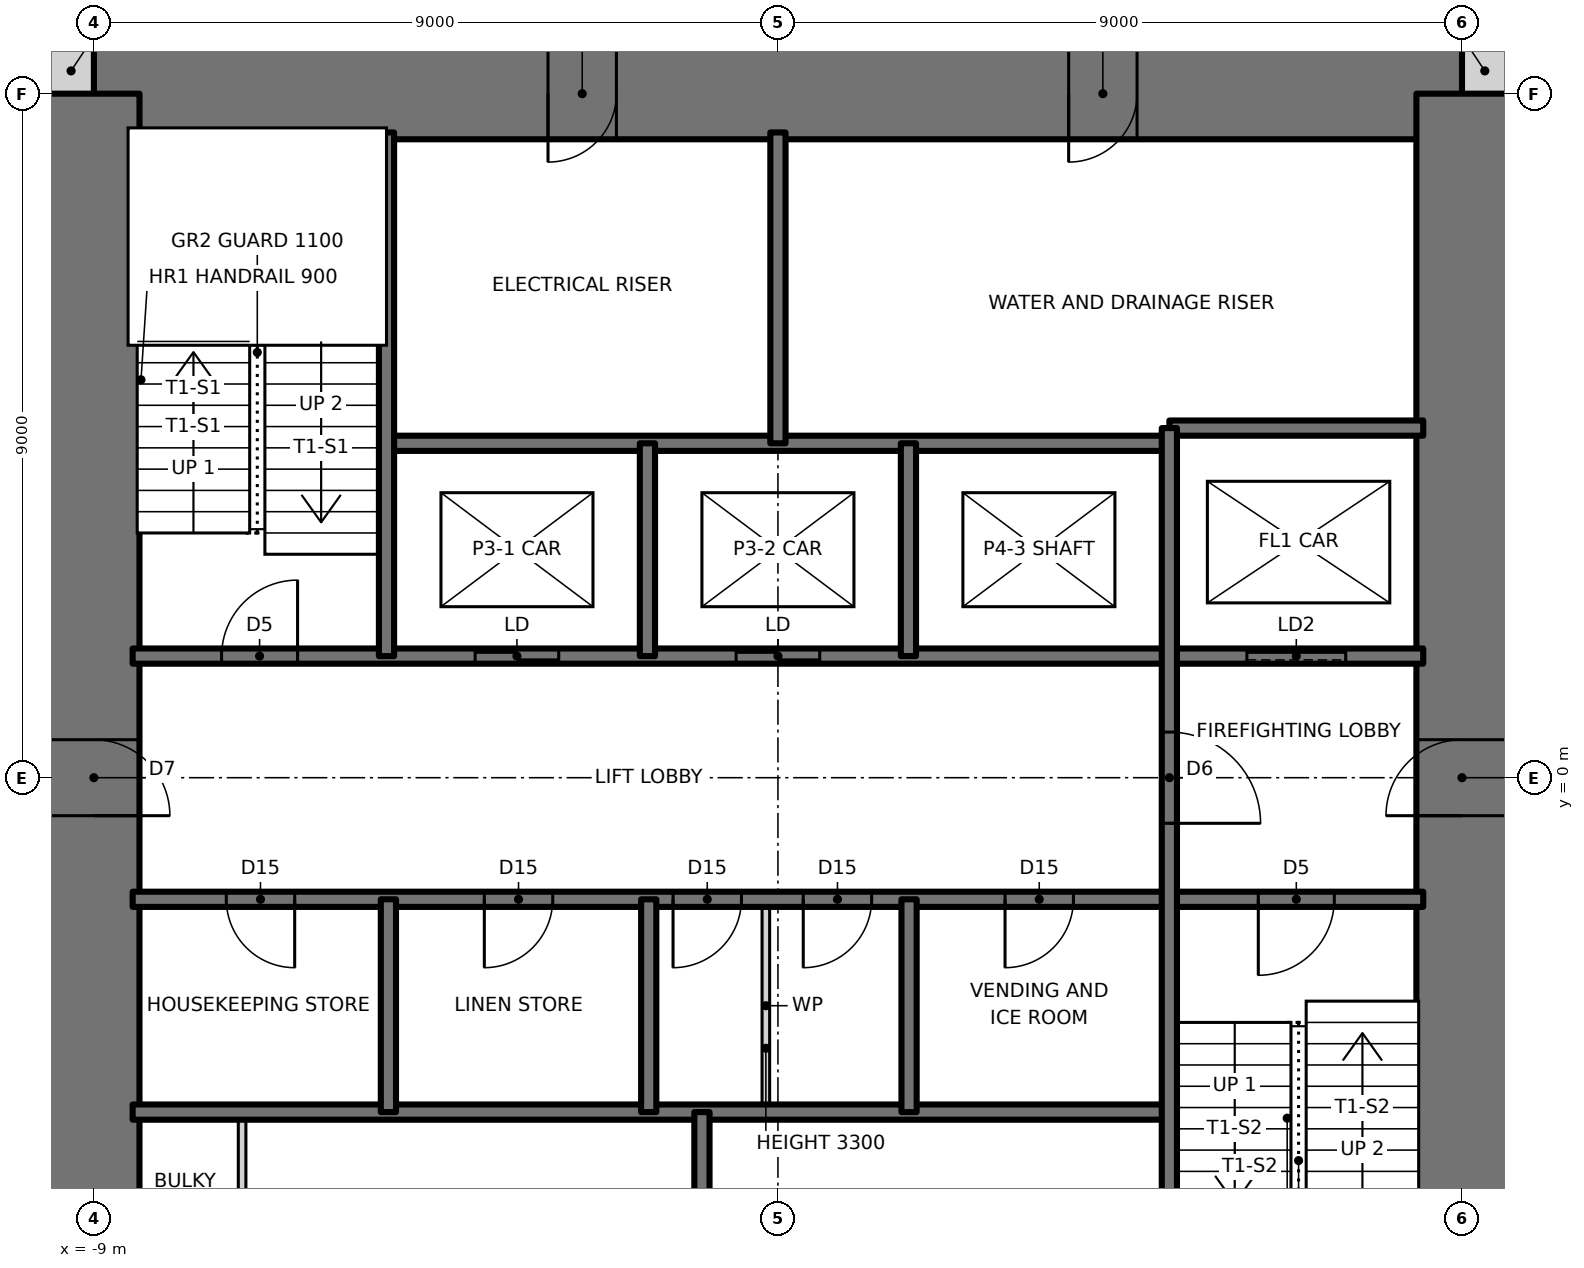
"""IFC4 building model, lengths in metres.
Left out: names, types, materials, properties, quantities, classifications, styles, units other than length and angle.
Written with IfcOpenShell. Run it as: python <this file> out.ifc"""

import sys

from ifc_helpers import new_model, si_unit, direction, frame, frame_2d, origin, place, context, subcontext, project, spatial, rectangle, extrude, element, fill, save


model = new_model("IFC4")
c1 = context("Model", 3, precision=1e-05, world=origin(), true_north=direction((0.0, 1.0)))
c2 = subcontext(c1, "Body", "Model", "MODEL_VIEW")
j1 = project(units=[si_unit("LENGTHUNIT", "METRE"), si_unit("PLANEANGLEUNIT", "RADIAN")], contexts=[c1])
p1 = place(None, origin())
s1 = spatial("IfcSite", under=j1, at=p1, CompositionType="ELEMENT")
p2 = place(p1, origin())
s2 = spatial("IfcBuilding", under=s1, at=p2, CompositionType="ELEMENT")
p3 = place(p2, frame((0.0, 0.0, 174.0)))
s3 = spatial("IfcBuildingStorey", under=s2, at=p3, CompositionType="ELEMENT", Elevation=174.0)
for number, where, z_axis, x_axis in (
    (1, (9.0, 9.3, 0.0), (0.0, 0.0, 1.0), (1.0, 0.0, 0.0)),
    (2, (-9.6, 9.3, 0.0), (0.0, 0.0, 1.0), (1.0, 0.0, 0.0)),
):
    element("IfcWall", number, at=place(p3, frame(where, z_axis=z_axis, x_axis=x_axis)), inside=s3, PredefinedType="SOLIDWALL", context=c2, shape_type="SweptSolid", body=[
        extrude(rectangle(XDim=0.6, YDim=0.6, at=frame_2d((0.3, 0.0))), origin(), (0.0, 0.0, 1.0), 3.5),
    ])
p4 = place(p3, frame((9.0, 9.0, 0.0), z_axis=(0.0, 0.0, 1.0), x_axis=(-1.0, 0.0, 0.0)))
e3 = element("IfcWall", 3, at=p4, inside=s3, PredefinedType="SHEAR", context=c2, shape_type="SweptSolid", body=[
    extrude(rectangle(XDim=18.0, YDim=1.2, at=frame_2d((9.0, 0.0))), origin(), (0.0, 0.0, 1.0), 3.5),
])
p5 = place(p4, frame((11.125, 0.0, 0.0)))
e4 = element("IfcOpeningElement", 4, at=p5, cuts=e3, PredefinedType="OPENING", context=c2, shape_type="SweptSolid", body=[
    extrude(rectangle(XDim=0.9, YDim=2.1, at=frame_2d((0.45, 1.05))), frame((0.0, 0.61, 0.0), z_axis=(0.0, -1.0, 0.0), x_axis=(1.0, 0.0, 0.0)), (0.0, 0.0, 1.0), 1.22),
])
p6 = place(p4, frame((4.275, 0.0, 0.0)))
e5 = element("IfcOpeningElement", 5, at=p6, cuts=e3, PredefinedType="OPENING", context=c2, shape_type="SweptSolid", body=[
    extrude(rectangle(XDim=0.9, YDim=2.1, at=frame_2d((0.45, 1.05))), frame((0.0, 0.61, 0.0), z_axis=(0.0, -1.0, 0.0), x_axis=(1.0, 0.0, 0.0)), (0.0, 0.0, 1.0), 1.22),
])
p7 = place(p3, frame((9.0, -9.0, 0.0), z_axis=(0.0, 0.0, 1.0), x_axis=(0.0, 1.0, 0.0)))
e6 = element("IfcWall", 6, at=p7, inside=s3, PredefinedType="SHEAR", context=c2, shape_type="SweptSolid", body=[
    extrude(rectangle(XDim=18.0, YDim=1.2, at=frame_2d((9.0, 0.0))), origin(), (0.0, 0.0, 1.0), 3.5),
])
p8 = place(p7, frame((8.5, 0.0, 0.0)))
e7 = element("IfcOpeningElement", 7, at=p8, cuts=e6, PredefinedType="OPENING", context=c2, shape_type="SweptSolid", body=[
    extrude(rectangle(XDim=1.0, YDim=2.1, at=frame_2d((0.5, 1.05))), frame((0.0, 0.61, 0.0), z_axis=(0.0, -1.0, 0.0), x_axis=(1.0, 0.0, 0.0)), (0.0, 0.0, 1.0), 1.22),
])
p9 = place(p3, frame((-9.0, 9.0, 0.0), z_axis=(0.0, 0.0, 1.0), x_axis=(0.0, -1.0, 0.0)))
e8 = element("IfcWall", 8, at=p9, inside=s3, PredefinedType="SHEAR", context=c2, shape_type="SweptSolid", body=[
    extrude(rectangle(XDim=18.0, YDim=1.2, at=frame_2d((9.0, 0.0))), origin(), (0.0, 0.0, 1.0), 3.5),
])
p10 = place(p9, frame((8.5, 0.0, 0.0)))
e9 = element("IfcOpeningElement", 9, at=p10, cuts=e8, PredefinedType="OPENING", context=c2, shape_type="SweptSolid", body=[
    extrude(rectangle(XDim=1.0, YDim=2.1, at=frame_2d((0.5, 1.05))), frame((0.0, 0.61, 0.0), z_axis=(0.0, -1.0, 0.0), x_axis=(1.0, 0.0, 0.0)), (0.0, 0.0, 1.0), 1.22),
])
p11 = place(p3, frame((-8.49, -4.4, 0.0), z_axis=(0.0, 0.0, 1.0), x_axis=(1.0, 0.0, 0.0)))
e10 = element("IfcWall", 10, at=p11, inside=s3, PredefinedType="SOLIDWALL", context=c2, shape_type="SweptSolid", body=[
    extrude(rectangle(XDim=13.64, YDim=0.2, at=frame_2d((6.82, 0.0))), origin(), (0.0, 0.0, 1.0), 3.5),
])
p12 = place(p3, frame((-8.49, -1.6, 0.0), z_axis=(0.0, 0.0, 1.0), x_axis=(1.0, 0.0, 0.0)))
e11 = element("IfcWall", 11, at=p12, inside=s3, PredefinedType="SOLIDWALL", context=c2, shape_type="SweptSolid", body=[
    extrude(rectangle(XDim=16.98, YDim=0.2, at=frame_2d((8.49, 0.0))), origin(), (0.0, 0.0, 1.0), 3.5),
])
p13 = place(p12, frame((14.81, 0.0, 0.0)))
e12 = element("IfcOpeningElement", 12, at=p13, cuts=e11, PredefinedType="OPENING", context=c2, shape_type="SweptSolid", body=[
    extrude(rectangle(XDim=1.0, YDim=2.1, at=frame_2d((0.5, 1.05))), frame((0.0, 0.11, 0.0), z_axis=(0.0, -1.0, 0.0), x_axis=(1.0, 0.0, 0.0)), (0.0, 0.0, 1.0), 0.22),
])
p14 = place(p12, frame((1.232, 0.0, 0.0)))
e13 = element("IfcOpeningElement", 13, at=p14, cuts=e11, PredefinedType="OPENING", context=c2, shape_type="SweptSolid", body=[
    extrude(rectangle(XDim=0.9, YDim=2.1, at=frame_2d((0.45, 1.05))), frame((0.0, 0.11, 0.0), z_axis=(0.0, -1.0, 0.0), x_axis=(1.0, 0.0, 0.0)), (0.0, 0.0, 1.0), 0.22),
])
p15 = place(p12, frame((4.627, 0.0, 0.0)))
e14 = element("IfcOpeningElement", 14, at=p15, cuts=e11, PredefinedType="OPENING", context=c2, shape_type="SweptSolid", body=[
    extrude(rectangle(XDim=0.9, YDim=2.1, at=frame_2d((0.45, 1.05))), frame((0.0, 0.11, 0.0), z_axis=(0.0, -1.0, 0.0), x_axis=(1.0, 0.0, 0.0)), (0.0, 0.0, 1.0), 0.22),
])
p16 = place(p12, frame((8.823, 0.0, 0.0)))
e15 = element("IfcOpeningElement", 15, at=p16, cuts=e11, PredefinedType="OPENING", context=c2, shape_type="SweptSolid", body=[
    extrude(rectangle(XDim=0.9, YDim=2.1, at=frame_2d((0.45, 1.05))), frame((0.0, 0.11, 0.0), z_axis=(0.0, -1.0, 0.0), x_axis=(1.0, 0.0, 0.0)), (0.0, 0.0, 1.0), 0.22),
])
p17 = place(p12, frame((7.11, 0.0, 0.0)))
e16 = element("IfcOpeningElement", 16, at=p17, cuts=e11, PredefinedType="OPENING", context=c2, shape_type="SweptSolid", body=[
    extrude(rectangle(XDim=0.9, YDim=2.1, at=frame_2d((0.45, 1.05))), frame((0.0, 0.11, 0.0), z_axis=(0.0, -1.0, 0.0), x_axis=(1.0, 0.0, 0.0)), (0.0, 0.0, 1.0), 0.22),
])
p18 = place(p12, frame((11.478, 0.0, 0.0)))
e17 = element("IfcOpeningElement", 17, at=p18, cuts=e11, PredefinedType="OPENING", context=c2, shape_type="SweptSolid", body=[
    extrude(rectangle(XDim=0.9, YDim=2.1, at=frame_2d((0.45, 1.05))), frame((0.0, 0.11, 0.0), z_axis=(0.0, -1.0, 0.0), x_axis=(1.0, 0.0, 0.0)), (0.0, 0.0, 1.0), 0.22),
])
p19 = place(p3, frame((-8.49, 1.6, 0.0), z_axis=(0.0, 0.0, 1.0), x_axis=(1.0, 0.0, 0.0)))
e18 = element("IfcWall", 18, at=p19, inside=s3, PredefinedType="SOLIDWALL", context=c2, shape_type="SweptSolid", body=[
    extrude(rectangle(XDim=16.98, YDim=0.2, at=frame_2d((8.49, 0.0))), origin(), (0.0, 0.0, 1.0), 3.5),
])
p20 = place(p19, frame((1.17, 0.0, 0.0)))
e19 = element("IfcOpeningElement", 19, at=p20, cuts=e18, PredefinedType="OPENING", context=c2, shape_type="SweptSolid", body=[
    extrude(rectangle(XDim=1.0, YDim=2.1, at=frame_2d((0.5, 1.05))), frame((0.0, 0.11, 0.0), z_axis=(0.0, -1.0, 0.0), x_axis=(1.0, 0.0, 0.0)), (0.0, 0.0, 1.0), 0.22),
])
p21 = place(p19, frame((4.506, 0.0, 0.0)))
e20 = element("IfcOpeningElement", 20, at=p21, cuts=e18, PredefinedType="OPENING", context=c2, shape_type="SweptSolid", body=[
    extrude(rectangle(XDim=1.1, YDim=2.1, at=frame_2d((0.55, 1.05))), frame((0.0, 0.11, 0.0), z_axis=(0.0, -1.0, 0.0), x_axis=(1.0, 0.0, 0.0)), (0.0, 0.0, 1.0), 0.22),
])
p22 = place(p19, frame((7.94, 0.0, 0.0)))
e21 = element("IfcOpeningElement", 21, at=p22, cuts=e18, PredefinedType="OPENING", context=c2, shape_type="SweptSolid", body=[
    extrude(rectangle(XDim=1.1, YDim=2.1, at=frame_2d((0.55, 1.05))), frame((0.0, 0.11, 0.0), z_axis=(0.0, -1.0, 0.0), x_axis=(1.0, 0.0, 0.0)), (0.0, 0.0, 1.0), 0.22),
])
p23 = place(p19, frame((14.66, 0.0, 0.0)))
e22 = element("IfcOpeningElement", 22, at=p23, cuts=e18, PredefinedType="OPENING", context=c2, shape_type="SweptSolid", body=[
    extrude(rectangle(XDim=1.3, YDim=2.1, at=frame_2d((0.65, 1.05))), frame((0.0, 0.11, 0.0), z_axis=(0.0, -1.0, 0.0), x_axis=(1.0, 0.0, 0.0)), (0.0, 0.0, 1.0), 0.22),
])
p24 = place(p3, frame((-5.15, 4.4, 0.0), z_axis=(0.0, 0.0, 1.0), x_axis=(1.0, 0.0, 0.0)))
e23 = element("IfcWall", 23, at=p24, inside=s3, PredefinedType="SOLIDWALL", context=c2, shape_type="SweptSolid", body=[
    extrude(rectangle(XDim=10.3, YDim=0.2, at=frame_2d((5.15, 0.0))), origin(), (0.0, 0.0, 1.0), 3.5),
])
p25 = place(p3, frame((5.15, 4.6, 0.0), z_axis=(0.0, 0.0, 1.0), x_axis=(1.0, 0.0, 0.0)))
e24 = element("IfcWall", 24, at=p25, inside=s3, PredefinedType="SOLIDWALL", context=c2, shape_type="SweptSolid", body=[
    extrude(rectangle(XDim=3.34, YDim=0.2, at=frame_2d((1.67, 0.0))), origin(), (0.0, 0.0, 1.0), 3.5),
])
p26 = place(p3, frame((5.15, -8.49, 0.0), z_axis=(0.0, 0.0, 1.0), x_axis=(0.0, 1.0, 0.0)))
e25 = element("IfcWall", 25, at=p26, inside=s3, PredefinedType="SOLIDWALL", context=c2, shape_type="SweptSolid", body=[
    extrude(rectangle(XDim=13.09, YDim=0.2, at=frame_2d((6.545, 0.0))), origin(), (0.0, 0.0, 1.0), 3.5),
])
p27 = place(p26, frame((7.89, 0.0, 0.0)))
e26 = element("IfcOpeningElement", 26, at=p27, cuts=e25, PredefinedType="OPENING", context=c2, shape_type="SweptSolid", body=[
    extrude(rectangle(XDim=1.2, YDim=2.1, at=frame_2d((0.6, 1.05))), frame((0.0, 0.11, 0.0), z_axis=(0.0, -1.0, 0.0), x_axis=(1.0, 0.0, 0.0)), (0.0, 0.0, 1.0), 0.22),
])
for number, where, z_axis, x_axis in (
    (27, (1.725, -4.4, 0.0), (0.0, 0.0, 1.0), (0.0, 1.0, 0.0)),
    (28, (1.717, 1.6, 0.0), (0.0, 0.0, 1.0), (0.0, 1.0, 0.0)),
):
    element("IfcWall", number, at=place(p3, frame(where, z_axis=z_axis, x_axis=x_axis)), inside=s3, PredefinedType="SOLIDWALL", context=c2, shape_type="SweptSolid", body=[
        extrude(rectangle(XDim=2.8, YDim=0.2, at=frame_2d((1.4, 0.0))), origin(), (0.0, 0.0, 1.0), 3.5),
    ])
p28 = place(p3, frame((0.0, 4.4, 0.0), z_axis=(0.0, 0.0, 1.0), x_axis=(0.0, 1.0, 0.0)))
e29 = element("IfcWall", 29, at=p28, inside=s3, PredefinedType="SOLIDWALL", context=c2, shape_type="SweptSolid", body=[
    extrude(rectangle(XDim=4.09, YDim=0.2, at=frame_2d((2.045, 0.0))), origin(), (0.0, 0.0, 1.0), 3.5),
])
p29 = place(p3, frame((-0.159, -4.4, 0.0), z_axis=(0.0, 0.0, 1.0), x_axis=(0.0, 1.0, 0.0)))
e30 = element("IfcWall", 30, at=p29, inside=s3, PredefinedType="PARTITIONING", context=c2, shape_type="SweptSolid", body=[
    extrude(rectangle(XDim=2.8, YDim=0.1, at=frame_2d((1.4, 0.0))), origin(), (0.0, 0.0, 1.0), 3.3),
])
p30 = place(p3, frame((-1.0, -8.49, 0.0), z_axis=(0.0, 0.0, 1.0), x_axis=(0.0, 1.0, 0.0)))
e31 = element("IfcWall", 31, at=p30, inside=s3, PredefinedType="SOLIDWALL", context=c2, shape_type="SweptSolid", body=[
    extrude(rectangle(XDim=4.09, YDim=0.2, at=frame_2d((2.045, 0.0))), origin(), (0.0, 0.0, 1.0), 3.5),
])
for number, where, z_axis, x_axis in (
    (32, (-1.7, -4.4, 0.0), (0.0, 0.0, 1.0), (0.0, 1.0, 0.0)),
    (33, (-1.717, 1.6, 0.0), (0.0, 0.0, 1.0), (0.0, 1.0, 0.0)),
    (34, (-5.125, -4.4, 0.0), (0.0, 0.0, 1.0), (0.0, 1.0, 0.0)),
):
    element("IfcWall", number, at=place(p3, frame(where, z_axis=z_axis, x_axis=x_axis)), inside=s3, PredefinedType="SOLIDWALL", context=c2, shape_type="SweptSolid", body=[
        extrude(rectangle(XDim=2.8, YDim=0.2, at=frame_2d((1.4, 0.0))), origin(), (0.0, 0.0, 1.0), 3.5),
    ])
p31 = place(p3, frame((-5.15, 1.6, 0.0), z_axis=(0.0, 0.0, 1.0), x_axis=(0.0, 1.0, 0.0)))
e35 = element("IfcWall", 35, at=p31, inside=s3, PredefinedType="SOLIDWALL", context=c2, shape_type="SweptSolid", body=[
    extrude(rectangle(XDim=6.89, YDim=0.2, at=frame_2d((3.445, 0.0))), origin(), (0.0, 0.0, 1.0), 3.5),
])
p32 = place(p3, frame((-7.05, -8.49, 0.0), z_axis=(0.0, 0.0, 1.0), x_axis=(0.0, 1.0, 0.0)))
e36 = element("IfcWall", 36, at=p32, inside=s3, PredefinedType="PARTITIONING", context=c2, shape_type="SweptSolid", body=[
    extrude(rectangle(XDim=4.09, YDim=0.1, at=frame_2d((2.045, 0.0))), origin(), (0.0, 0.0, 1.0), 3.3),
])
p33 = place(p32, frame((1.595, 0.0, 0.0)))
e37 = element("IfcOpeningElement", 37, at=p33, cuts=e36, PredefinedType="OPENING", context=c2, shape_type="SweptSolid", body=[
    extrude(rectangle(XDim=0.9, YDim=2.1, at=frame_2d((0.45, 1.05))), frame((0.0, 0.06, 0.0), z_axis=(0.0, -1.0, 0.0), x_axis=(1.0, 0.0, 0.0)), (0.0, 0.0, 1.0), 0.12),
])
p34 = place(p20, origin())
e38 = element("IfcDoor", 38, at=p34, inside=s3, OperationType="SINGLE_SWING_RIGHT", PredefinedType="DOOR", context=c2, shape_type="SweptSolid", body=[
    extrude(rectangle(XDim=1.0, YDim=2.1, at=frame_2d((0.5, 1.05))), frame((0.0, 0.025, 0.0), z_axis=(0.0, -1.0, 0.0), x_axis=(1.0, 0.0, 0.0)), (0.0, 0.0, 1.0), 0.05),
])
fill(e19, e38)
p35 = place(p13, frame((1.0, 0.0, 0.0), z_axis=(0.0, 0.0, 1.0), x_axis=(-1.0, 0.0, 0.0)))
e39 = element("IfcDoor", 39, at=p35, inside=s3, OperationType="SINGLE_SWING_RIGHT", PredefinedType="DOOR", context=c2, shape_type="SweptSolid", body=[
    extrude(rectangle(XDim=1.0, YDim=2.1, at=frame_2d((0.5, 1.05))), frame((0.0, 0.025, 0.0), z_axis=(0.0, -1.0, 0.0), x_axis=(1.0, 0.0, 0.0)), (0.0, 0.0, 1.0), 0.05),
])
fill(e12, e39)
p36 = place(p27, frame((1.2, 0.0, 0.0), z_axis=(0.0, 0.0, 1.0), x_axis=(-1.0, 0.0, 0.0)))
e40 = element("IfcDoor", 40, at=p36, inside=s3, OperationType="SINGLE_SWING_RIGHT", PredefinedType="DOOR", context=c2, shape_type="SweptSolid", body=[
    extrude(rectangle(XDim=1.2, YDim=2.1, at=frame_2d((0.6, 1.05))), frame((0.0, 0.025, 0.0), z_axis=(0.0, -1.0, 0.0), x_axis=(1.0, 0.0, 0.0)), (0.0, 0.0, 1.0), 0.05),
])
fill(e26, e40)
p37 = place(p14, frame((0.9, 0.0, 0.0), z_axis=(0.0, 0.0, 1.0), x_axis=(-1.0, 0.0, 0.0)))
e41 = element("IfcDoor", 41, at=p37, inside=s3, OperationType="SINGLE_SWING_LEFT", PredefinedType="DOOR", context=c2, shape_type="SweptSolid", body=[
    extrude(rectangle(XDim=0.9, YDim=2.1, at=frame_2d((0.45, 1.05))), frame((0.0, 0.025, 0.0), z_axis=(0.0, -1.0, 0.0), x_axis=(1.0, 0.0, 0.0)), (0.0, 0.0, 1.0), 0.05),
])
fill(e13, e41)
p38 = place(p15, frame((0.9, 0.0, 0.0), z_axis=(0.0, 0.0, 1.0), x_axis=(-1.0, 0.0, 0.0)))
e42 = element("IfcDoor", 42, at=p38, inside=s3, OperationType="SINGLE_SWING_RIGHT", PredefinedType="DOOR", context=c2, shape_type="SweptSolid", body=[
    extrude(rectangle(XDim=0.9, YDim=2.1, at=frame_2d((0.45, 1.05))), frame((0.0, 0.025, 0.0), z_axis=(0.0, -1.0, 0.0), x_axis=(1.0, 0.0, 0.0)), (0.0, 0.0, 1.0), 0.05),
])
fill(e14, e42)
p39 = place(p16, frame((0.9, 0.0, 0.0), z_axis=(0.0, 0.0, 1.0), x_axis=(-1.0, 0.0, 0.0)))
e43 = element("IfcDoor", 43, at=p39, inside=s3, OperationType="SINGLE_SWING_RIGHT", PredefinedType="DOOR", context=c2, shape_type="SweptSolid", body=[
    extrude(rectangle(XDim=0.9, YDim=2.1, at=frame_2d((0.45, 1.05))), frame((0.0, 0.025, 0.0), z_axis=(0.0, -1.0, 0.0), x_axis=(1.0, 0.0, 0.0)), (0.0, 0.0, 1.0), 0.05),
])
fill(e15, e43)
p40 = place(p17, frame((0.9, 0.0, 0.0), z_axis=(0.0, 0.0, 1.0), x_axis=(-1.0, 0.0, 0.0)))
e44 = element("IfcDoor", 44, at=p40, inside=s3, OperationType="SINGLE_SWING_RIGHT", PredefinedType="DOOR", context=c2, shape_type="SweptSolid", body=[
    extrude(rectangle(XDim=0.9, YDim=2.1, at=frame_2d((0.45, 1.05))), frame((0.0, 0.025, 0.0), z_axis=(0.0, -1.0, 0.0), x_axis=(1.0, 0.0, 0.0)), (0.0, 0.0, 1.0), 0.05),
])
fill(e16, e44)
p41 = place(p18, frame((0.9, 0.0, 0.0), z_axis=(0.0, 0.0, 1.0), x_axis=(-1.0, 0.0, 0.0)))
e45 = element("IfcDoor", 45, at=p41, inside=s3, OperationType="SINGLE_SWING_RIGHT", PredefinedType="DOOR", context=c2, shape_type="SweptSolid", body=[
    extrude(rectangle(XDim=0.9, YDim=2.1, at=frame_2d((0.45, 1.05))), frame((0.0, 0.025, 0.0), z_axis=(0.0, -1.0, 0.0), x_axis=(1.0, 0.0, 0.0)), (0.0, 0.0, 1.0), 0.05),
])
fill(e17, e45)
p42 = place(p10, origin())
e46 = element("IfcDoor", 46, at=p42, inside=s3, OperationType="SINGLE_SWING_RIGHT", PredefinedType="DOOR", context=c2, shape_type="SweptSolid", body=[
    extrude(rectangle(XDim=1.0, YDim=2.1, at=frame_2d((0.5, 1.05))), frame((0.0, 0.025, 0.0), z_axis=(0.0, -1.0, 0.0), x_axis=(1.0, 0.0, 0.0)), (0.0, 0.0, 1.0), 0.05),
])
fill(e9, e46)
p43 = place(p8, origin())
e47 = element("IfcDoor", 47, at=p43, inside=s3, OperationType="SINGLE_SWING_LEFT", PredefinedType="DOOR", context=c2, shape_type="SweptSolid", body=[
    extrude(rectangle(XDim=1.0, YDim=2.1, at=frame_2d((0.5, 1.05))), frame((0.0, 0.025, 0.0), z_axis=(0.0, -1.0, 0.0), x_axis=(1.0, 0.0, 0.0)), (0.0, 0.0, 1.0), 0.05),
])
fill(e7, e47)
p44 = place(p5, origin())
e48 = element("IfcDoor", 48, at=p44, inside=s3, OperationType="SINGLE_SWING_RIGHT", PredefinedType="DOOR", context=c2, shape_type="SweptSolid", body=[
    extrude(rectangle(XDim=0.9, YDim=2.1, at=frame_2d((0.45, 1.05))), frame((0.0, 0.025, 0.0), z_axis=(0.0, -1.0, 0.0), x_axis=(1.0, 0.0, 0.0)), (0.0, 0.0, 1.0), 0.05),
])
fill(e4, e48)
p45 = place(p6, origin())
e49 = element("IfcDoor", 49, at=p45, inside=s3, OperationType="SINGLE_SWING_RIGHT", PredefinedType="DOOR", context=c2, shape_type="SweptSolid", body=[
    extrude(rectangle(XDim=0.9, YDim=2.1, at=frame_2d((0.45, 1.05))), frame((0.0, 0.025, 0.0), z_axis=(0.0, -1.0, 0.0), x_axis=(1.0, 0.0, 0.0)), (0.0, 0.0, 1.0), 0.05),
])
fill(e5, e49)
p46 = place(p21, origin())
e50 = element("IfcDoor", 50, at=p46, inside=s3, OperationType="DOUBLE_DOOR_SLIDING", PredefinedType="DOOR", context=c2, shape_type="SweptSolid", body=[
    extrude(rectangle(XDim=1.1, YDim=2.1, at=frame_2d((0.55, 1.05))), frame((0.0, 0.025, 0.0), z_axis=(0.0, -1.0, 0.0), x_axis=(1.0, 0.0, 0.0)), (0.0, 0.0, 1.0), 0.05),
])
fill(e20, e50)
p47 = place(p22, origin())
e51 = element("IfcDoor", 51, at=p47, inside=s3, OperationType="DOUBLE_DOOR_SLIDING", PredefinedType="DOOR", context=c2, shape_type="SweptSolid", body=[
    extrude(rectangle(XDim=1.1, YDim=2.1, at=frame_2d((0.55, 1.05))), frame((0.0, 0.025, 0.0), z_axis=(0.0, -1.0, 0.0), x_axis=(1.0, 0.0, 0.0)), (0.0, 0.0, 1.0), 0.05),
])
fill(e21, e51)
p48 = place(p23, origin())
e52 = element("IfcDoor", 52, at=p48, inside=s3, OperationType="SLIDING_TO_LEFT", PredefinedType="DOOR", context=c2, shape_type="SweptSolid", body=[
    extrude(rectangle(XDim=1.3, YDim=2.1, at=frame_2d((0.65, 1.05))), frame((0.0, 0.025, 0.0), z_axis=(0.0, -1.0, 0.0), x_axis=(1.0, 0.0, 0.0)), (0.0, 0.0, 1.0), 0.05),
])
fill(e22, e52)
save(model, sys.argv[1])
